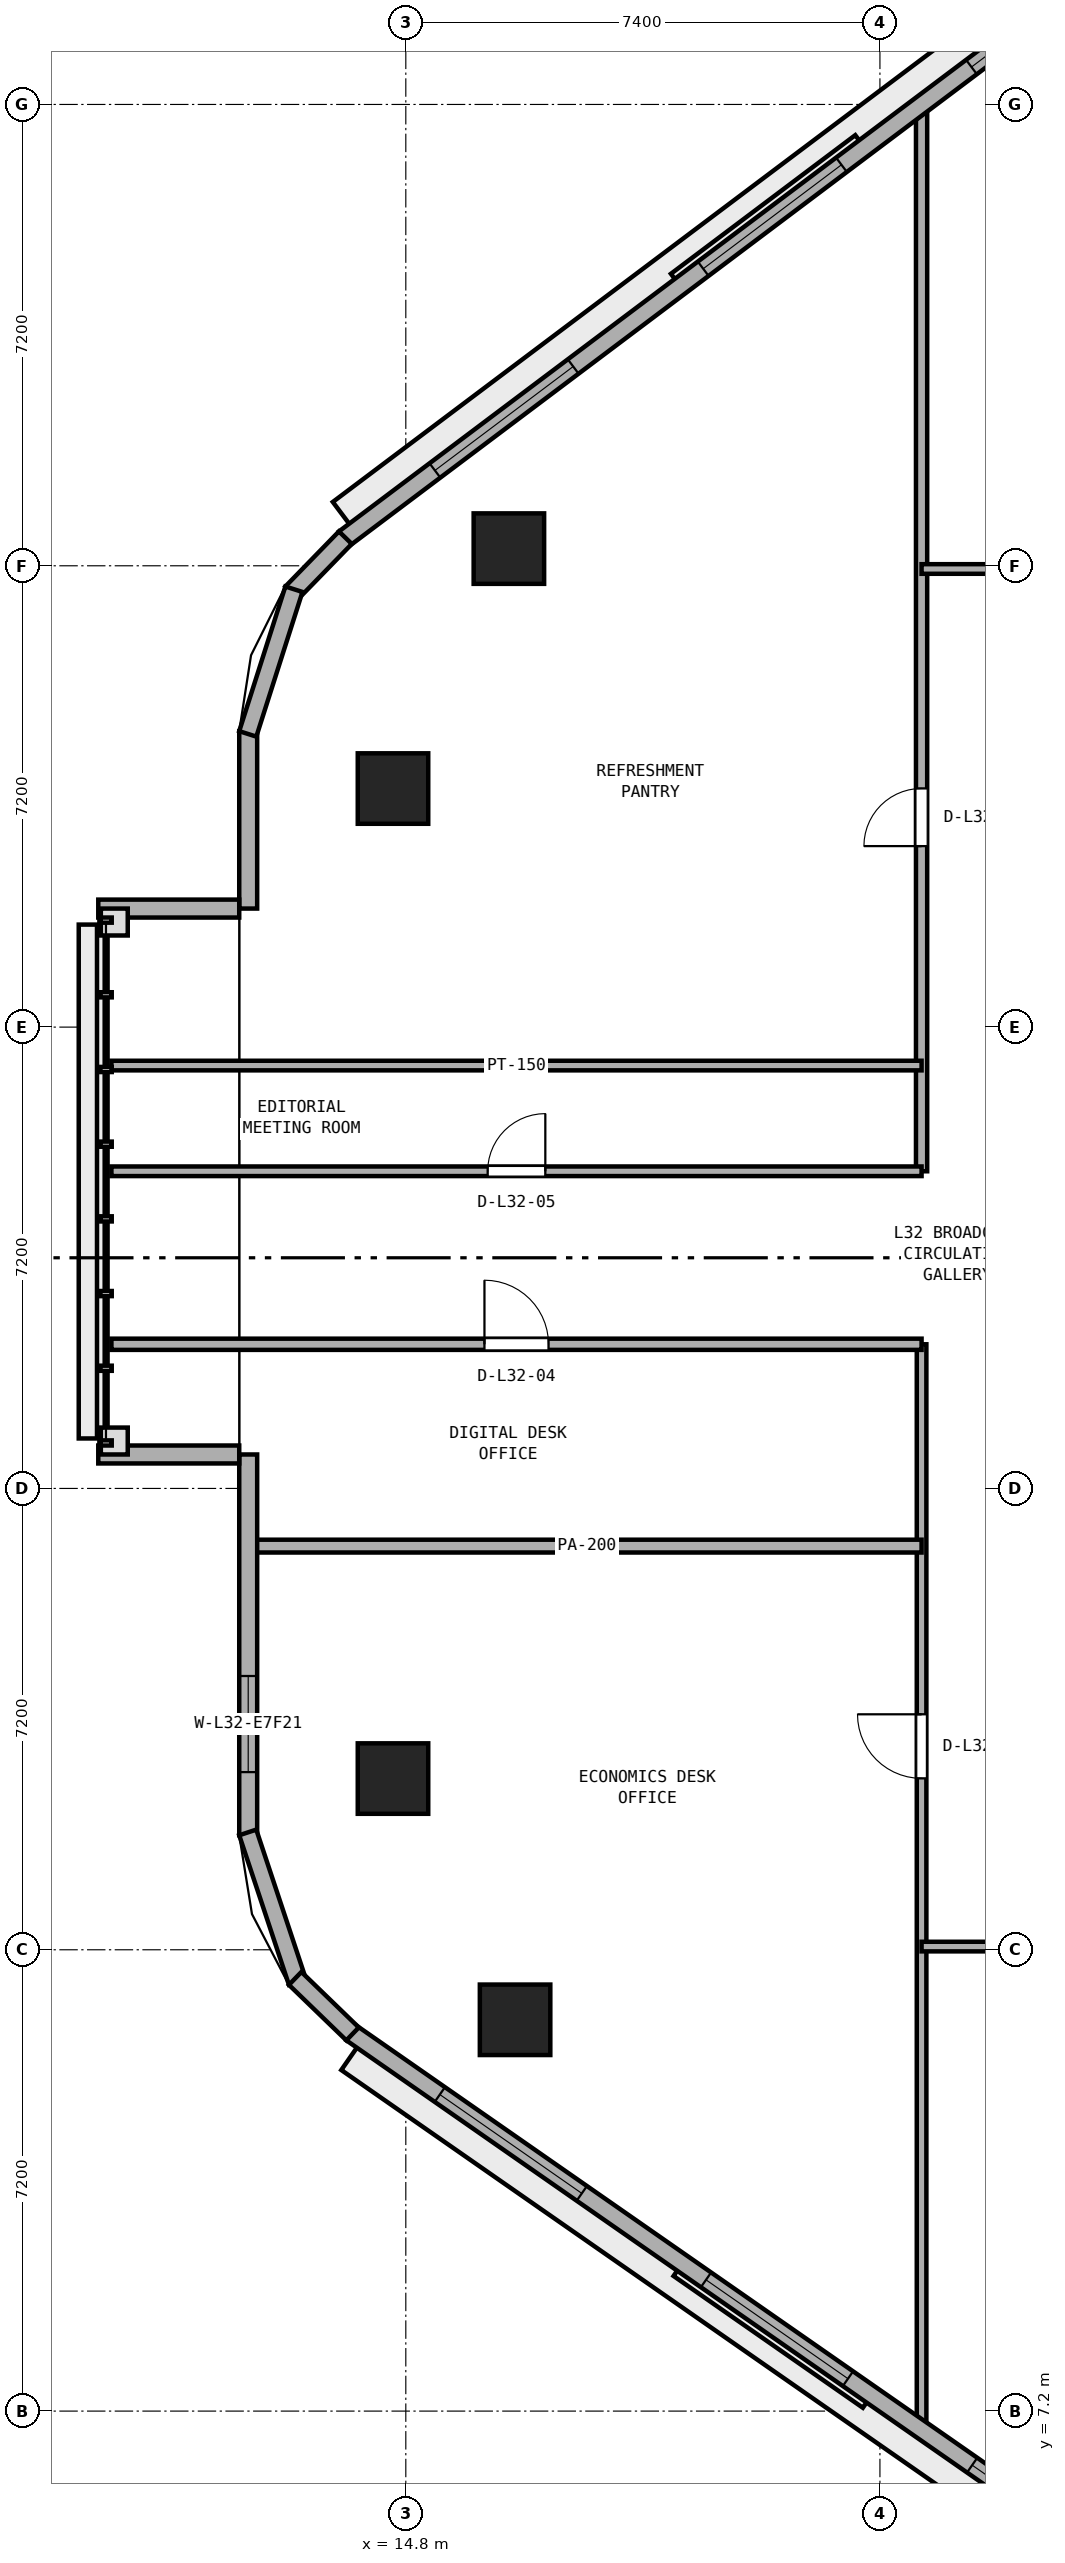
"""IFC4 building model, lengths in metres.
Left out: names, types, materials, properties, quantities, classifications, styles, units other than length and angle.
Written with IfcOpenShell. Run it as: python <this file> out.ifc"""

import sys

from ifc_helpers import new_model, si_unit, direction, frame, frame_2d, origin, origin_2d, place, context, subcontext, project, spatial, rectangle, extrude, element, fill, save


model = new_model("IFC4")
c1 = context("Model", 3, precision=1e-05, world=origin(), true_north=direction((0.0, 1.0)))
c2 = subcontext(c1, "Body", "Model", "MODEL_VIEW")
j1 = project(units=[si_unit("LENGTHUNIT", "METRE"), si_unit("PLANEANGLEUNIT", "RADIAN")], contexts=[c1])
p1 = place(None, origin())
s1 = spatial("IfcSite", under=j1, at=p1, CompositionType="ELEMENT")
p2 = place(p1, origin())
s2 = spatial("IfcBuilding", under=s1, at=p2, CompositionType="ELEMENT")
p3 = place(p2, frame((0.0, 0.0, 128.8)))
s3 = spatial("IfcBuildingStorey", under=s2, at=p3, CompositionType="ELEMENT", Elevation=128.8)
for number, where, z_axis, x_axis in (
    (1, (16.409, 36.268, 0.0), (0.0, 0.0, 1.0), (1.0, 0.0, 0.0)),
    (2, (14.6, 32.523, 0.0), (0.0, 0.0, 1.0), (1.0, 0.0, 0.0)),
    (3, (14.6, 17.072, 0.0), (0.0, 0.0, 1.0), (1.0, 0.0, 0.0)),
    (4, (16.505, 13.307, 0.0), (0.0, 0.0, 1.0), (1.0, 0.0, 0.0)),
):
    element("IfcColumn", number, at=place(p3, frame(where, z_axis=z_axis, x_axis=x_axis)), inside=s3, PredefinedType="COLUMN", context=c2, shape_type="SweptSolid", body=[
        extrude(rectangle(XDim=1.1, YDim=1.1, at=origin_2d()), origin(), (0.0, 0.0, 1.0), 3.8),
    ])
p4 = place(p3, frame((22.85, 6.875, 0.0), z_axis=(0.0, 0.0, 1.0), x_axis=(0.0, 1.0, 0.0)))
e5 = element("IfcWall", 5, at=p4, inside=s3, PredefinedType="PARTITIONING", context=c2, shape_type="SweptSolid", body=[
    extrude(rectangle(XDim=16.975, YDim=0.15, at=frame_2d((8.487, 0.0))), origin(), (0.0, 0.0, 1.0), 3.54),
])
p5 = place(p4, frame((10.199, 0.0, 0.0)))
e6 = element("IfcOpeningElement", 6, at=p5, cuts=e5, PredefinedType="OPENING", context=c2, shape_type="SweptSolid", body=[
    extrude(rectangle(XDim=1.0, YDim=2.12, at=frame_2d((0.5, 1.06))), frame((0.0, 0.085, 0.0), z_axis=(0.0, -1.0, 0.0), x_axis=(1.0, 0.0, 0.0)), (0.0, 0.0, 1.0), 0.17),
])
p6 = place(p3, frame((22.85, 26.55, 0.0), z_axis=(0.0, 0.0, 1.0), x_axis=(0.0, 1.0, 0.0)))
e7 = element("IfcWall", 7, at=p6, inside=s3, PredefinedType="PARTITIONING", context=c2, shape_type="SweptSolid", body=[
    extrude(rectangle(XDim=16.684, YDim=0.175, at=frame_2d((8.342, 0.0))), origin(), (0.0, 0.0, 1.0), 3.54),
])
p7 = place(p6, frame((5.075, 0.0, 0.0)))
e8 = element("IfcOpeningElement", 8, at=p7, cuts=e7, PredefinedType="OPENING", context=c2, shape_type="SweptSolid", body=[
    extrude(rectangle(XDim=0.9, YDim=2.1, at=frame_2d((0.45, 1.05))), frame((0.0, 0.097, 0.0), z_axis=(0.0, -1.0, 0.0), x_axis=(1.0, 0.0, 0.0)), (0.0, 0.0, 1.0), 0.195),
])
p8 = place(p3, frame((22.85, 14.45, 0.0), z_axis=(0.0, 0.0, 1.0), x_axis=(1.0, 0.0, 0.0)))
e9 = element("IfcWall", 9, at=p8, inside=s3, PredefinedType="PARTITIONING", context=c2, shape_type="SweptSolid", body=[
    extrude(rectangle(XDim=28.3, YDim=0.15, at=frame_2d((14.15, 0.0))), origin(), (0.0, 0.0, 1.0), 3.54),
])
p9 = place(p8, frame((13.65, 0.0, 0.0)))
e10 = element("IfcOpeningElement", 10, at=p9, cuts=e9, PredefinedType="OPENING", context=c2, shape_type="SweptSolid", body=[
    extrude(rectangle(XDim=1.0, YDim=2.12, at=frame_2d((0.5, 1.06))), frame((0.0, 0.085, 0.0), z_axis=(0.0, -1.0, 0.0), x_axis=(1.0, 0.0, 0.0)), (0.0, 0.0, 1.0), 0.17),
])
p10 = place(p3, frame((12.405, 20.7, 0.0), z_axis=(0.0, 0.0, 1.0), x_axis=(1.0, 0.0, 0.0)))
e11 = element("IfcWall", 11, at=p10, inside=s3, PredefinedType="PARTITIONING", context=c2, shape_type="SweptSolid", body=[
    extrude(rectangle(XDim=10.445, YDim=0.2, at=frame_2d((5.223, 0.0))), origin(), (0.0, 0.0, 1.0), 3.54),
])
p11 = place(p3, frame((10.205, 23.85, 0.0), z_axis=(0.0, 0.0, 1.0), x_axis=(1.0, 0.0, 0.0)))
e12 = element("IfcWall", 12, at=p11, inside=s3, PredefinedType="PARTITIONING", context=c2, shape_type="SweptSolid", body=[
    extrude(rectangle(XDim=12.645, YDim=0.175, at=frame_2d((6.323, 0.0))), origin(), (0.0, 0.0, 1.0), 3.54),
])
p12 = place(p11, frame((5.823, 0.0, 0.0)))
e13 = element("IfcOpeningElement", 13, at=p12, cuts=e12, PredefinedType="OPENING", context=c2, shape_type="SweptSolid", body=[
    extrude(rectangle(XDim=1.0, YDim=2.12, at=frame_2d((0.5, 1.06))), frame((0.0, 0.097, 0.0), z_axis=(0.0, -1.0, 0.0), x_axis=(1.0, 0.0, 0.0)), (0.0, 0.0, 1.0), 0.195),
])
p13 = place(p3, frame((10.205, 26.55, 0.0), z_axis=(0.0, 0.0, 1.0), x_axis=(1.0, 0.0, 0.0)))
e14 = element("IfcWall", 14, at=p13, inside=s3, PredefinedType="PARTITIONING", context=c2, shape_type="SweptSolid", body=[
    extrude(rectangle(XDim=12.645, YDim=0.15, at=frame_2d((6.323, 0.0))), origin(), (0.0, 0.0, 1.0), 3.54),
])
p14 = place(p13, frame((5.873, 0.0, 0.0)))
e15 = element("IfcOpeningElement", 15, at=p14, cuts=e14, PredefinedType="OPENING", context=c2, shape_type="SweptSolid", body=[
    extrude(rectangle(XDim=0.9, YDim=2.1, at=frame_2d((0.45, 1.05))), frame((0.0, 0.085, 0.0), z_axis=(0.0, -1.0, 0.0), x_axis=(1.0, 0.0, 0.0)), (0.0, 0.0, 1.0), 0.17),
])
p15 = place(p3, frame((10.205, 28.2, 0.0), z_axis=(0.0, 0.0, 1.0), x_axis=(1.0, 0.0, 0.0)))
e16 = element("IfcWall", 16, at=p15, inside=s3, PredefinedType="PARTITIONING", context=c2, shape_type="SweptSolid", body=[
    extrude(rectangle(XDim=12.645, YDim=0.15, at=frame_2d((6.323, 0.0))), origin(), (0.0, 0.0, 1.0), 3.54),
])
p16 = place(p3, frame((22.85, 35.95, 0.0), z_axis=(0.0, 0.0, 1.0), x_axis=(1.0, 0.0, 0.0)))
e17 = element("IfcWall", 17, at=p16, inside=s3, PredefinedType="PARTITIONING", context=c2, shape_type="SweptSolid", body=[
    extrude(rectangle(XDim=11.55, YDim=0.15, at=frame_2d((5.775, 0.0))), origin(), (0.0, 0.0, 1.0), 3.54),
])
p17 = place(p16, frame((5.275, 0.0, 0.0)))
e18 = element("IfcOpeningElement", 18, at=p17, cuts=e17, PredefinedType="OPENING", context=c2, shape_type="SweptSolid", body=[
    extrude(rectangle(XDim=1.0, YDim=2.12, at=frame_2d((0.5, 1.06))), frame((0.0, 0.085, 0.0), z_axis=(0.0, -1.0, 0.0), x_axis=(1.0, 0.0, 0.0)), (0.0, 0.0, 1.0), 0.17),
])
p18 = place(p3, frame((27.201, 46.47, 0.0), z_axis=(0.0, 0.0, 1.0), x_axis=(-0.799280853427, -0.600957666849, 0.0)))
e19 = element("IfcWall", 19, at=p18, inside=s3, PredefinedType="STANDARD", context=c2, shape_type="SweptSolid", body=[
    extrude(rectangle(XDim=16.716, YDim=0.28, at=frame_2d((8.358, 0.0))), origin(), (0.0, 0.0, 1.0), 3.54),
])
p19 = place(p18, frame((1.769, 0.0, 0.9)))
e20 = element("IfcOpeningElement", 20, at=p19, cuts=e19, PredefinedType="OPENING", context=c2, shape_type="SweptSolid", body=[
    extrude(rectangle(XDim=2.7, YDim=1.75, at=frame_2d((1.35, 0.875))), frame((0.0, 0.15, 0.0), z_axis=(0.0, -1.0, 0.0), x_axis=(1.0, 0.0, 0.0)), (0.0, 0.0, 1.0), 0.3),
])
p20 = place(p18, frame((7.008, 0.0, 0.9)))
e21 = element("IfcOpeningElement", 21, at=p20, cuts=e19, PredefinedType="OPENING", context=c2, shape_type="SweptSolid", body=[
    extrude(rectangle(XDim=2.7, YDim=1.75, at=frame_2d((1.35, 0.875))), frame((0.0, 0.15, 0.0), z_axis=(0.0, -1.0, 0.0), x_axis=(1.0, 0.0, 0.0)), (0.0, 0.0, 1.0), 0.3),
])
p21 = place(p18, frame((12.247, 0.0, 0.9)))
e22 = element("IfcOpeningElement", 22, at=p21, cuts=e19, PredefinedType="OPENING", context=c2, shape_type="SweptSolid", body=[
    extrude(rectangle(XDim=2.7, YDim=1.75, at=frame_2d((1.35, 0.875))), frame((0.0, 0.15, 0.0), z_axis=(0.0, -1.0, 0.0), x_axis=(1.0, 0.0, 0.0)), (0.0, 0.0, 1.0), 0.3),
])
p22 = place(p3, frame((12.34, 33.419, 0.0), z_axis=(0.0, 0.0, 1.0), x_axis=(0.0, -1.0, 0.0)))
e23 = element("IfcWall", 23, at=p22, inside=s3, PredefinedType="STANDARD", context=c2, shape_type="SweptSolid", body=[
    extrude(rectangle(XDim=2.769, YDim=0.28, at=frame_2d((1.385, 0.0))), origin(), (0.0, 0.0, 1.0), 3.54),
])
p23 = place(p3, frame((12.34, 22.13, 0.0), z_axis=(0.0, 0.0, 1.0), x_axis=(0.0, -1.0, 0.0)))
e24 = element("IfcWall", 24, at=p23, inside=s3, PredefinedType="STANDARD", context=c2, shape_type="SweptSolid", body=[
    extrude(rectangle(XDim=5.943, YDim=0.28, at=frame_2d((2.971, 0.0))), origin(), (0.0, 0.0, 1.0), 3.54),
])
p24 = place(p23, frame((3.457, 0.0, 0.9)))
e25 = element("IfcOpeningElement", 25, at=p24, cuts=e24, PredefinedType="OPENING", context=c2, shape_type="SweptSolid", body=[
    extrude(rectangle(XDim=1.5, YDim=1.65, at=frame_2d((0.75, 0.825))), frame((0.0, 0.15, 0.0), z_axis=(0.0, -1.0, 0.0), x_axis=(1.0, 0.0, 0.0)), (0.0, 0.0, 1.0), 0.3),
])
p25 = place(p3, frame((13.952, 13.101, 0.0), z_axis=(0.0, 0.0, 1.0), x_axis=(0.820698239491, -0.571361881558, 0.0)))
e26 = element("IfcWall", 26, at=p25, inside=s3, PredefinedType="STANDARD", context=c2, shape_type="SweptSolid", body=[
    extrude(rectangle(XDim=16.186, YDim=0.28, at=frame_2d((8.093, 0.0))), origin(), (0.0, 0.0, 1.0), 3.54),
])
p26 = place(p25, frame((1.681, 0.0, 0.9)))
e27 = element("IfcOpeningElement", 27, at=p26, cuts=e26, PredefinedType="OPENING", context=c2, shape_type="SweptSolid", body=[
    extrude(rectangle(XDim=2.7, YDim=1.75, at=frame_2d((1.35, 0.875))), frame((0.0, 0.15, 0.0), z_axis=(0.0, -1.0, 0.0), x_axis=(1.0, 0.0, 0.0)), (0.0, 0.0, 1.0), 0.3),
])
p27 = place(p25, frame((6.743, 0.0, 0.9)))
e28 = element("IfcOpeningElement", 28, at=p27, cuts=e26, PredefinedType="OPENING", context=c2, shape_type="SweptSolid", body=[
    extrude(rectangle(XDim=2.7, YDim=1.75, at=frame_2d((1.35, 0.875))), frame((0.0, 0.15, 0.0), z_axis=(0.0, -1.0, 0.0), x_axis=(1.0, 0.0, 0.0)), (0.0, 0.0, 1.0), 0.3),
])
p28 = place(p25, frame((11.804, 0.0, 0.9)))
e29 = element("IfcOpeningElement", 29, at=p28, cuts=e26, PredefinedType="OPENING", context=c2, shape_type="SweptSolid", body=[
    extrude(rectangle(XDim=2.7, YDim=1.75, at=frame_2d((1.35, 0.875))), frame((0.0, 0.15, 0.0), z_axis=(0.0, -1.0, 0.0), x_axis=(1.0, 0.0, 0.0)), (0.0, 0.0, 1.0), 0.3),
])
p29 = place(p3, frame((13.856, 36.438, 0.0), z_axis=(0.0, 0.0, 1.0), x_axis=(-0.697369094044, -0.716712178404, 0.0)))
e30 = element("IfcWall", 30, at=p29, inside=s3, PredefinedType="STANDARD", context=c2, shape_type="SweptSolid", body=[
    extrude(rectangle(XDim=1.199, YDim=0.28, at=frame_2d((0.6, 0.0))), origin(), (0.0, 0.0, 1.0), 3.54),
])
p30 = place(p3, frame((13.053, 35.634, 0.0), z_axis=(0.0, 0.0, 1.0), x_axis=(-0.303807416298, -0.952733464198, 0.0)))
e31 = element("IfcWall", 31, at=p30, inside=s3, PredefinedType="STANDARD", context=c2, shape_type="SweptSolid", body=[
    extrude(rectangle(XDim=2.37, YDim=0.28, at=frame_2d((1.185, 0.0))), origin(), (0.0, 0.0, 1.0), 3.54),
])
p31 = place(p3, frame((12.333, 16.231, 0.0), z_axis=(0.0, 0.0, 1.0), x_axis=(0.315364302967, -0.94897068259, 0.0)))
e32 = element("IfcWall", 32, at=p31, inside=s3, PredefinedType="STANDARD", context=c2, shape_type="SweptSolid", body=[
    extrude(rectangle(XDim=2.46, YDim=0.28, at=frame_2d((1.23, 0.0))), origin(), (0.0, 0.0, 1.0), 3.54),
])
p32 = place(p3, frame((13.073, 13.953, 0.0), z_axis=(0.0, 0.0, 1.0), x_axis=(0.718958999036, -0.695052485576, 0.0)))
e33 = element("IfcWall", 33, at=p32, inside=s3, PredefinedType="STANDARD", context=c2, shape_type="SweptSolid", body=[
    extrude(rectangle(XDim=1.246, YDim=0.28, at=frame_2d((0.623, 0.0))), origin(), (0.0, 0.0, 1.0), 3.54),
])
for number, where, z_axis, x_axis in (
    (34, (10.0, 22.13, 0.0), (0.0, 0.0, 1.0), (1.0, 0.0, 0.0)),
    (35, (10.0, 30.65, 0.0), (0.0, 0.0, 1.0), (1.0, 0.0, 0.0)),
):
    element("IfcWall", number, at=place(p3, frame(where, z_axis=z_axis, x_axis=x_axis)), inside=s3, PredefinedType="STANDARD", context=c2, shape_type="SweptSolid", body=[
        extrude(rectangle(XDim=2.2, YDim=0.28, at=frame_2d((1.1, 0.0))), origin(), (0.0, 0.0, 1.0), 3.54),
    ])
p33 = place(p5, origin())
e36 = element("IfcDoor", 36, at=p33, inside=s3, OperationType="SINGLE_SWING_RIGHT", PredefinedType="DOOR", context=c2, shape_type="SweptSolid", body=[
    extrude(rectangle(XDim=1.0, YDim=2.12, at=frame_2d((0.5, 1.06))), frame((0.0, 0.025, 0.0), z_axis=(0.0, -1.0, 0.0), x_axis=(1.0, 0.0, 0.0)), (0.0, 0.0, 1.0), 0.05),
])
fill(e6, e36)
p34 = place(p12, origin())
e37 = element("IfcDoor", 37, at=p34, inside=s3, OperationType="SINGLE_SWING_LEFT", PredefinedType="DOOR", context=c2, shape_type="SweptSolid", body=[
    extrude(rectangle(XDim=1.0, YDim=2.12, at=frame_2d((0.5, 1.06))), frame((0.0, 0.025, 0.0), z_axis=(0.0, -1.0, 0.0), x_axis=(1.0, 0.0, 0.0)), (0.0, 0.0, 1.0), 0.05),
])
fill(e13, e37)
p35 = place(p14, origin())
e38 = element("IfcDoor", 38, at=p35, inside=s3, OperationType="SINGLE_SWING_RIGHT", PredefinedType="DOOR", context=c2, shape_type="SweptSolid", body=[
    extrude(rectangle(XDim=0.9, YDim=2.1, at=frame_2d((0.45, 1.05))), frame((0.0, 0.025, 0.0), z_axis=(0.0, -1.0, 0.0), x_axis=(1.0, 0.0, 0.0)), (0.0, 0.0, 1.0), 0.05),
])
fill(e15, e38)
p36 = place(p7, origin())
e39 = element("IfcDoor", 39, at=p36, inside=s3, OperationType="SINGLE_SWING_LEFT", PredefinedType="DOOR", context=c2, shape_type="SweptSolid", body=[
    extrude(rectangle(XDim=0.9, YDim=2.1, at=frame_2d((0.45, 1.05))), frame((0.0, 0.025, 0.0), z_axis=(0.0, -1.0, 0.0), x_axis=(1.0, 0.0, 0.0)), (0.0, 0.0, 1.0), 0.05),
])
fill(e8, e39)
p37 = place(p19, origin())
e40 = element("IfcWindow", 40, at=p37, inside=s3, PartitioningType="SINGLE_PANEL", PredefinedType="WINDOW", context=c2, shape_type="SweptSolid", body=[
    extrude(rectangle(XDim=2.7, YDim=1.75, at=frame_2d((1.35, 0.875))), frame((0.0, 0.03, 0.0), z_axis=(0.0, -1.0, 0.0), x_axis=(1.0, 0.0, 0.0)), (0.0, 0.0, 1.0), 0.06),
])
fill(e20, e40)
p38 = place(p20, origin())
e41 = element("IfcWindow", 41, at=p38, inside=s3, PartitioningType="SINGLE_PANEL", PredefinedType="WINDOW", context=c2, shape_type="SweptSolid", body=[
    extrude(rectangle(XDim=2.7, YDim=1.75, at=frame_2d((1.35, 0.875))), frame((0.0, 0.03, 0.0), z_axis=(0.0, -1.0, 0.0), x_axis=(1.0, 0.0, 0.0)), (0.0, 0.0, 1.0), 0.06),
])
fill(e21, e41)
p39 = place(p21, origin())
e42 = element("IfcWindow", 42, at=p39, inside=s3, PartitioningType="SINGLE_PANEL", PredefinedType="WINDOW", context=c2, shape_type="SweptSolid", body=[
    extrude(rectangle(XDim=2.7, YDim=1.75, at=frame_2d((1.35, 0.875))), frame((0.0, 0.03, 0.0), z_axis=(0.0, -1.0, 0.0), x_axis=(1.0, 0.0, 0.0)), (0.0, 0.0, 1.0), 0.06),
])
fill(e22, e42)
p40 = place(p24, origin())
e43 = element("IfcWindow", 43, at=p40, inside=s3, PartitioningType="SINGLE_PANEL", PredefinedType="WINDOW", context=c2, shape_type="SweptSolid", body=[
    extrude(rectangle(XDim=1.5, YDim=1.65, at=frame_2d((0.75, 0.825))), frame((0.0, 0.03, 0.0), z_axis=(0.0, -1.0, 0.0), x_axis=(1.0, 0.0, 0.0)), (0.0, 0.0, 1.0), 0.06),
])
fill(e25, e43)
p41 = place(p26, origin())
e44 = element("IfcWindow", 44, at=p41, inside=s3, PartitioningType="SINGLE_PANEL", PredefinedType="WINDOW", context=c2, shape_type="SweptSolid", body=[
    extrude(rectangle(XDim=2.7, YDim=1.75, at=frame_2d((1.35, 0.875))), frame((0.0, 0.03, 0.0), z_axis=(0.0, -1.0, 0.0), x_axis=(1.0, 0.0, 0.0)), (0.0, 0.0, 1.0), 0.06),
])
fill(e27, e44)
p42 = place(p27, origin())
e45 = element("IfcWindow", 45, at=p42, inside=s3, PartitioningType="SINGLE_PANEL", PredefinedType="WINDOW", context=c2, shape_type="SweptSolid", body=[
    extrude(rectangle(XDim=2.7, YDim=1.75, at=frame_2d((1.35, 0.875))), frame((0.0, 0.03, 0.0), z_axis=(0.0, -1.0, 0.0), x_axis=(1.0, 0.0, 0.0)), (0.0, 0.0, 1.0), 0.06),
])
fill(e28, e45)
p43 = place(p28, origin())
e46 = element("IfcWindow", 46, at=p43, inside=s3, PartitioningType="SINGLE_PANEL", PredefinedType="WINDOW", context=c2, shape_type="SweptSolid", body=[
    extrude(rectangle(XDim=2.7, YDim=1.75, at=frame_2d((1.35, 0.875))), frame((0.0, 0.03, 0.0), z_axis=(0.0, -1.0, 0.0), x_axis=(1.0, 0.0, 0.0)), (0.0, 0.0, 1.0), 0.06),
])
fill(e29, e46)
save(model, sys.argv[1])
